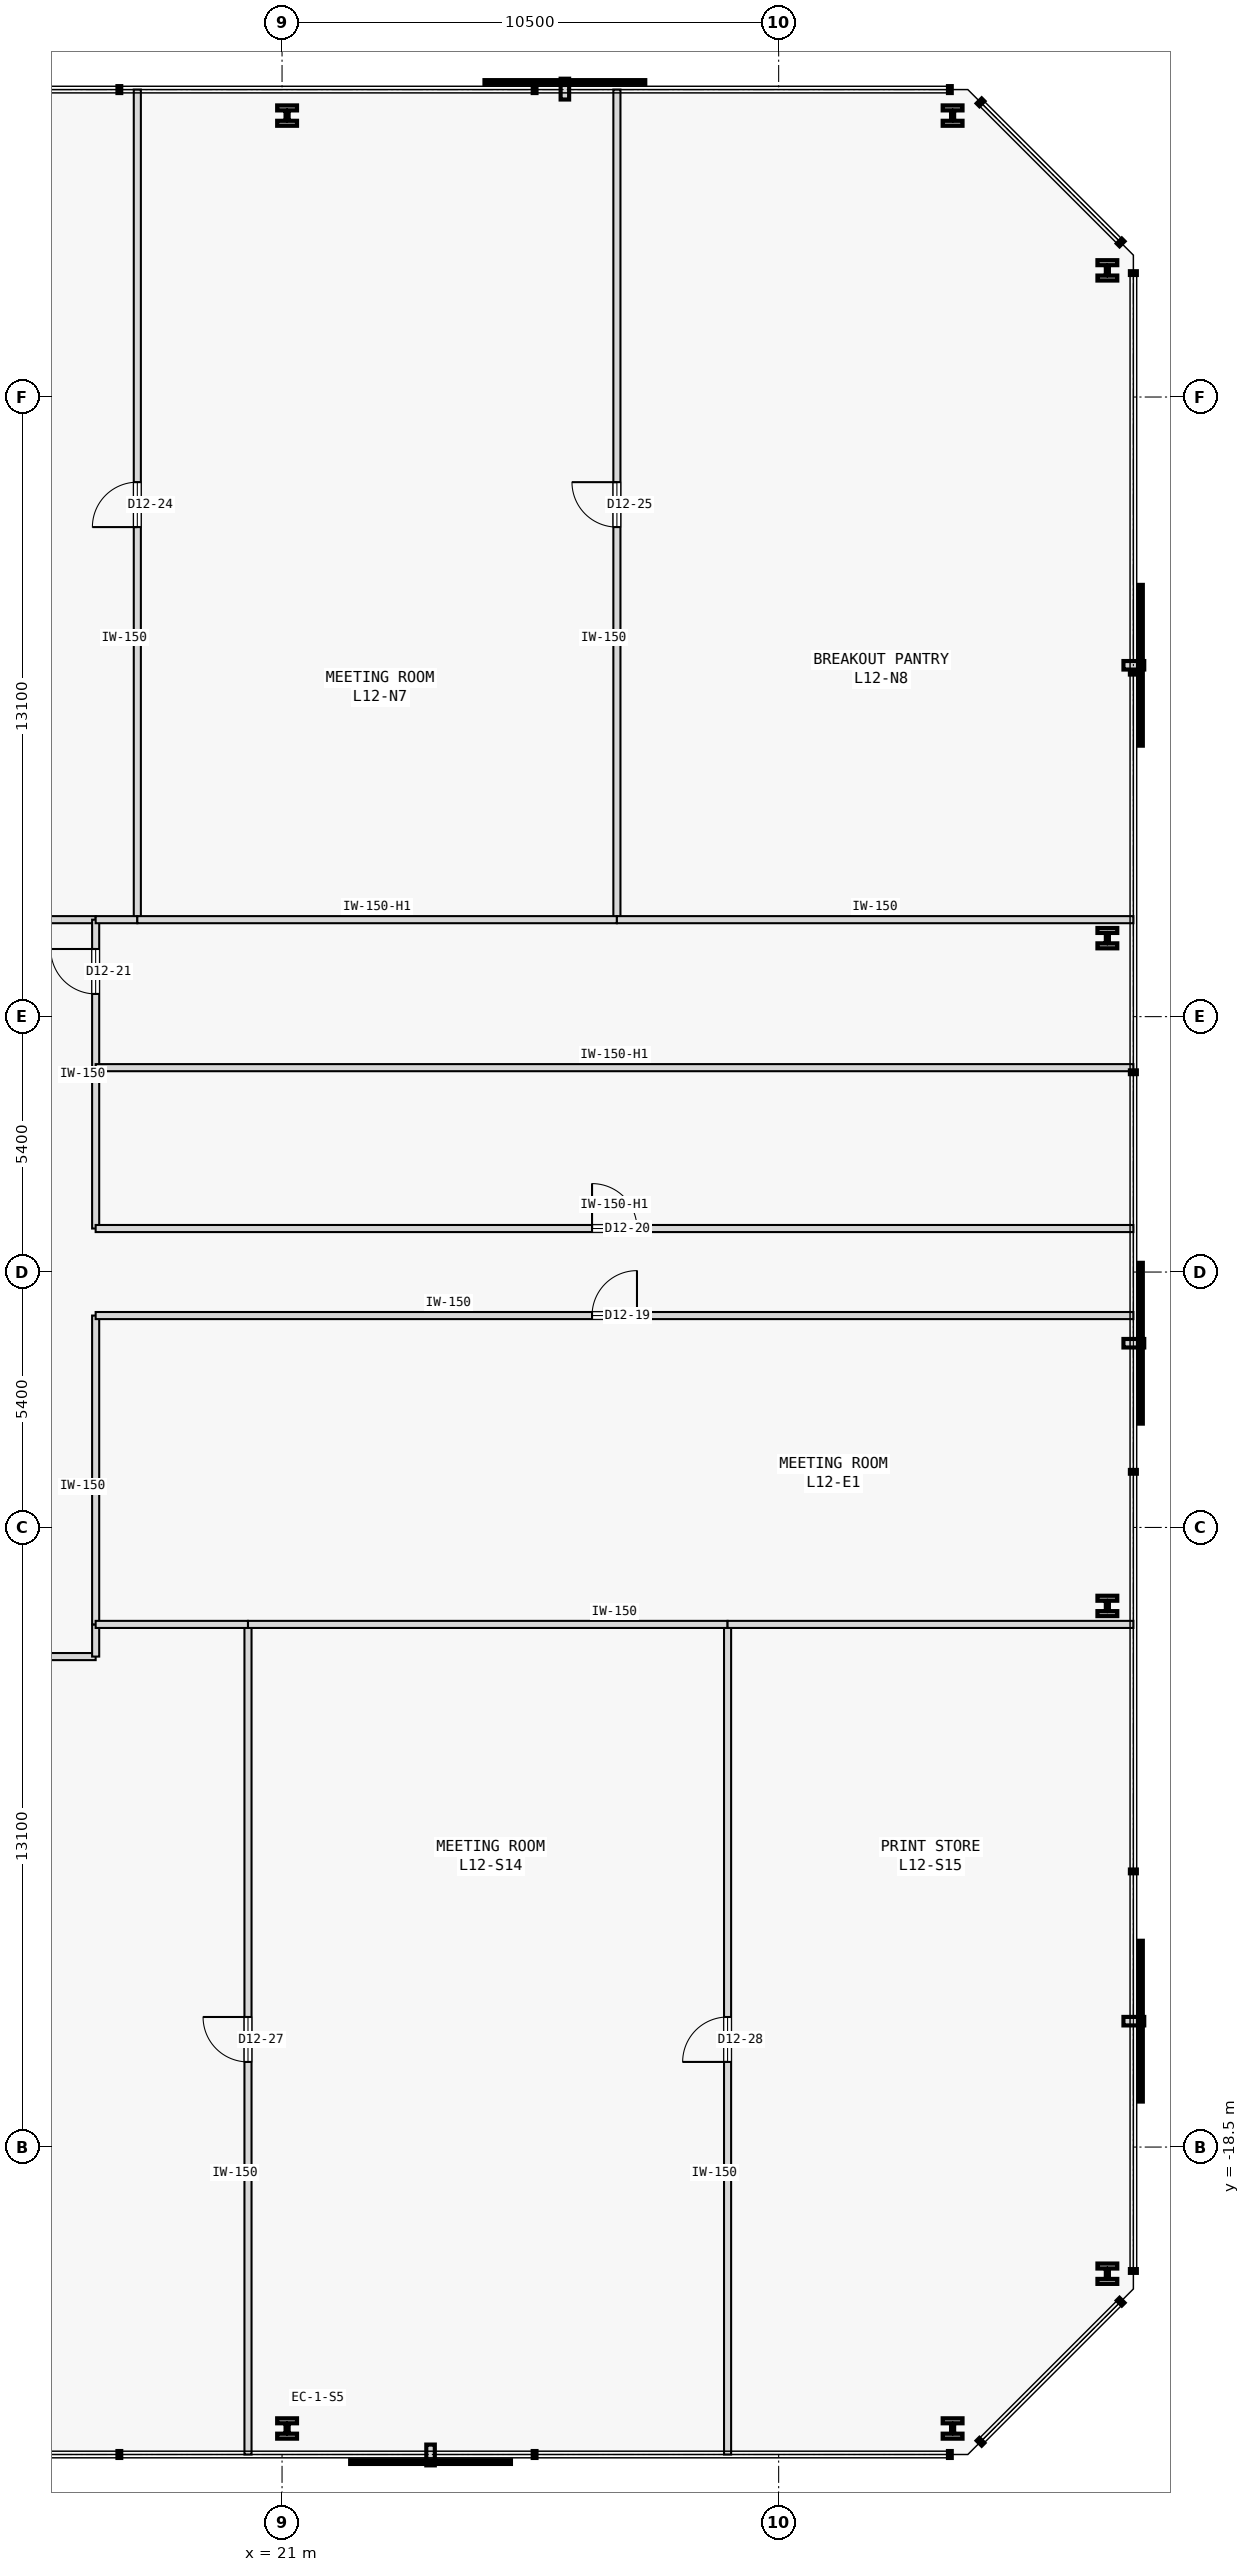
"""IFC4 building model, lengths in metres.
Left out: names, types, materials, properties, quantities, classifications, styles, units other than length and angle.
Written with IfcOpenShell. Run it as: python <this file> out.ifc"""

import sys

from ifc_helpers import new_model, si_unit, direction, frame, frame_2d, origin, origin_2d, place, context, subcontext, project, spatial, rectangle, i_section, extrude, element, fill, save


model = new_model("IFC4")
c1 = context("Model", 3, precision=1e-05, world=origin(), true_north=direction((0.0, 1.0)))
c2 = subcontext(c1, "Body", "Model", "MODEL_VIEW")
j1 = project(units=[si_unit("LENGTHUNIT", "METRE"), si_unit("PLANEANGLEUNIT", "RADIAN")], contexts=[c1])
p1 = place(None, origin())
s1 = spatial("IfcSite", under=j1, at=p1, CompositionType="ELEMENT")
p2 = place(p1, origin())
s2 = spatial("IfcBuilding", under=s1, at=p2, CompositionType="ELEMENT")
p3 = place(p2, frame((0.0, 0.0, 52.2)))
s3 = spatial("IfcBuildingStorey", under=s2, at=p3, CompositionType="ELEMENT", Elevation=52.2)
for number, where, z_axis, x_axis in (
    (1, (21.107, -24.45, 0.0), (0.0, 0.0, 1.0), (1.0, 0.0, 0.0)),
    (2, (35.178, -24.45, 0.0), (0.0, 0.0, 1.0), (1.0, 0.0, 0.0)),
    (3, (38.45, -21.178, 0.0), (0.0, 0.0, 1.0), (1.0, 0.0, 0.0)),
    (4, (38.45, -7.059, 0.0), (0.0, 0.0, 1.0), (1.0, 0.0, 0.0)),
    (5, (38.45, 7.059, 0.0), (0.0, 0.0, 1.0), (1.0, 0.0, 0.0)),
    (6, (38.45, 21.178, 0.0), (0.0, 0.0, 1.0), (1.0, 0.0, 0.0)),
    (7, (35.178, 24.45, 0.0), (0.0, 0.0, 1.0), (1.0, 0.0, 0.0)),
    (8, (21.107, 24.45, 0.0), (0.0, 0.0, 1.0), (1.0, 0.0, 0.0)),
):
    element("IfcColumn", number, at=place(p3, frame(where, z_axis=z_axis, x_axis=x_axis)), inside=s3, PredefinedType="COLUMN", context=c2, shape_type="SweptSolid", body=[
        extrude(i_section(OverallWidth=0.42, OverallDepth=0.431, WebThickness=0.065, FlangeThickness=0.106, FilletRadius=0.015, at=origin_2d()), origin(), (0.0, 0.0, 1.0), 3.8),
    ])
p4 = place(p3, frame((7.02, 7.45, 0.0), z_axis=(0.0, 0.0, 1.0), x_axis=(1.0, 0.0, 0.0)))
e9 = element("IfcWall", 9, at=p4, inside=s3, PredefinedType="PARTITIONING", context=c2, shape_type="SweptSolid", body=[
    extrude(rectangle(XDim=10.039, YDim=0.15, at=frame_2d((5.02, 0.0))), origin(), (0.0, 0.0, 1.0), 3.575),
])
p5 = place(p4, frame((4.544, 0.0, 0.0)))
e10 = element("IfcOpeningElement", 10, at=p5, cuts=e9, PredefinedType="OPENING", context=c2, shape_type="SweptSolid", body=[
    extrude(rectangle(XDim=0.95, YDim=2.15, at=frame_2d((0.475, 1.075))), frame((0.0, 0.085, 0.0), z_axis=(0.0, -1.0, 0.0), x_axis=(1.0, 0.0, 0.0)), (0.0, 0.0, 1.0), 0.17),
])
p6 = place(p3, frame((9.36, -8.13, 0.0), z_axis=(0.0, 0.0, 1.0), x_axis=(1.0, 0.0, 0.0)))
e11 = element("IfcWall", 11, at=p6, inside=s3, PredefinedType="PARTITIONING", context=c2, shape_type="SweptSolid", body=[
    extrude(rectangle(XDim=7.699, YDim=0.15, at=frame_2d((3.85, 0.0))), origin(), (0.0, 0.0, 1.0), 3.575),
])
p7 = place(p6, frame((3.375, 0.0, 0.0)))
e12 = element("IfcOpeningElement", 12, at=p7, cuts=e11, PredefinedType="OPENING", context=c2, shape_type="SweptSolid", body=[
    extrude(rectangle(XDim=0.95, YDim=2.15, at=frame_2d((0.475, 1.075))), frame((0.0, 0.085, 0.0), z_axis=(0.0, -1.0, 0.0), x_axis=(1.0, 0.0, 0.0)), (0.0, 0.0, 1.0), 0.17),
])
p8 = place(p3, frame((17.059, -8.13, 0.0), z_axis=(0.0, 0.0, 1.0), x_axis=(0.0, 1.0, 0.0)))
e13 = element("IfcWall", 13, at=p8, inside=s3, PredefinedType="PARTITIONING", context=c2, shape_type="SweptSolid", body=[
    extrude(rectangle(XDim=0.68, YDim=0.15, at=frame_2d((0.34, 0.0))), origin(), (0.0, 0.0, 1.0), 3.575),
])
p9 = place(p3, frame((17.059, -7.45, 0.0), z_axis=(0.0, 0.0, 1.0), x_axis=(0.0, 1.0, 0.0)))
e14 = element("IfcWall", 14, at=p9, inside=s3, PredefinedType="PARTITIONING", context=c2, shape_type="SweptSolid", body=[
    extrude(rectangle(XDim=6.53, YDim=0.15, at=frame_2d((3.265, 0.0))), origin(), (0.0, 0.0, 1.0), 3.575),
])
p10 = place(p3, frame((17.059, -0.92, 0.0), z_axis=(0.0, 0.0, 1.0), x_axis=(1.0, 0.0, 0.0)))
e15 = element("IfcWall", 15, at=p10, inside=s3, PredefinedType="PARTITIONING", context=c2, shape_type="SweptSolid", body=[
    extrude(rectangle(XDim=21.941, YDim=0.15, at=frame_2d((10.97, 0.0))), origin(), (0.0, 0.0, 1.0), 3.575),
])
p11 = place(p10, frame((10.496, 0.0, 0.0)))
e16 = element("IfcOpeningElement", 16, at=p11, cuts=e15, PredefinedType="OPENING", context=c2, shape_type="SweptSolid", body=[
    extrude(rectangle(XDim=0.95, YDim=2.15, at=frame_2d((0.475, 1.075))), frame((0.0, 0.085, 0.0), z_axis=(0.0, -1.0, 0.0), x_axis=(1.0, 0.0, 0.0)), (0.0, 0.0, 1.0), 0.17),
])
p12 = place(p3, frame((17.059, 0.92, 0.0), z_axis=(0.0, 0.0, 1.0), x_axis=(0.0, 1.0, 0.0)))
e17 = element("IfcWall", 17, at=p12, inside=s3, PredefinedType="PARTITIONING", context=c2, shape_type="SweptSolid", body=[
    extrude(rectangle(XDim=3.401, YDim=0.15, at=frame_2d((1.701, 0.0))), origin(), (0.0, 0.0, 1.0), 3.575),
])
p13 = place(p3, frame((17.059, 0.92, 0.0), z_axis=(0.0, 0.0, 1.0), x_axis=(1.0, 0.0, 0.0)))
e18 = element("IfcWall", 18, at=p13, inside=s3, PredefinedType="PARTITIONING", context=c2, shape_type="SweptSolid", body=[
    extrude(rectangle(XDim=21.941, YDim=0.15, at=frame_2d((10.97, 0.0))), origin(), (0.0, 0.0, 1.0), 3.125),
])
p14 = place(p13, frame((10.496, 0.0, 0.0)))
e19 = element("IfcOpeningElement", 19, at=p14, cuts=e18, PredefinedType="OPENING", context=c2, shape_type="SweptSolid", body=[
    extrude(rectangle(XDim=0.95, YDim=2.15, at=frame_2d((0.475, 1.075))), frame((0.0, 0.085, 0.0), z_axis=(0.0, -1.0, 0.0), x_axis=(1.0, 0.0, 0.0)), (0.0, 0.0, 1.0), 0.17),
])
p15 = place(p3, frame((17.059, 4.321, 0.0), z_axis=(0.0, 0.0, 1.0), x_axis=(0.0, 1.0, 0.0)))
e20 = element("IfcWall", 20, at=p15, inside=s3, PredefinedType="PARTITIONING", context=c2, shape_type="SweptSolid", body=[
    extrude(rectangle(XDim=3.129, YDim=0.15, at=frame_2d((1.564, 0.0))), origin(), (0.0, 0.0, 1.0), 3.575),
])
p16 = place(p15, frame((1.559, 0.0, 0.0)))
e21 = element("IfcOpeningElement", 21, at=p16, cuts=e20, PredefinedType="OPENING", context=c2, shape_type="SweptSolid", body=[
    extrude(rectangle(XDim=0.95, YDim=2.15, at=frame_2d((0.475, 1.075))), frame((0.0, 0.085, 0.0), z_axis=(0.0, -1.0, 0.0), x_axis=(1.0, 0.0, 0.0)), (0.0, 0.0, 1.0), 0.17),
])
p17 = place(p3, frame((17.94, 7.45, 0.0), z_axis=(0.0, 0.0, 1.0), x_axis=(0.0, 1.0, 0.0)))
e22 = element("IfcWall", 22, at=p17, inside=s3, PredefinedType="PARTITIONING", context=c2, shape_type="SweptSolid", body=[
    extrude(rectangle(XDim=17.55, YDim=0.15, at=frame_2d((8.775, 0.0))), origin(), (0.0, 0.0, 1.0), 3.575),
])
p18 = place(p17, frame((8.3, 0.0, 0.0)))
e23 = element("IfcOpeningElement", 23, at=p18, cuts=e22, PredefinedType="OPENING", context=c2, shape_type="SweptSolid", body=[
    extrude(rectangle(XDim=0.95, YDim=2.15, at=frame_2d((0.475, 1.075))), frame((0.0, 0.085, 0.0), z_axis=(0.0, -1.0, 0.0), x_axis=(1.0, 0.0, 0.0)), (0.0, 0.0, 1.0), 0.17),
])
p19 = place(p3, frame((17.059, 7.45, 0.0), z_axis=(0.0, 0.0, 1.0), x_axis=(1.0, 0.0, 0.0)))
e24 = element("IfcWall", 24, at=p19, inside=s3, PredefinedType="PARTITIONING", context=c2, shape_type="SweptSolid", body=[
    extrude(rectangle(XDim=0.881, YDim=0.15, at=frame_2d((0.44, 0.0))), origin(), (0.0, 0.0, 1.0), 3.575),
])
p20 = place(p3, frame((28.08, 7.45, 0.0), z_axis=(0.0, 0.0, 1.0), x_axis=(0.0, 1.0, 0.0)))
e25 = element("IfcWall", 25, at=p20, inside=s3, PredefinedType="PARTITIONING", context=c2, shape_type="SweptSolid", body=[
    extrude(rectangle(XDim=17.55, YDim=0.15, at=frame_2d((8.775, 0.0))), origin(), (0.0, 0.0, 1.0), 3.575),
])
p21 = place(p20, frame((8.3, 0.0, 0.0)))
e26 = element("IfcOpeningElement", 26, at=p21, cuts=e25, PredefinedType="OPENING", context=c2, shape_type="SweptSolid", body=[
    extrude(rectangle(XDim=0.95, YDim=2.15, at=frame_2d((0.475, 1.075))), frame((0.0, 0.085, 0.0), z_axis=(0.0, -1.0, 0.0), x_axis=(1.0, 0.0, 0.0)), (0.0, 0.0, 1.0), 0.17),
])
p22 = place(p3, frame((17.94, 7.45, 0.0), z_axis=(0.0, 0.0, 1.0), x_axis=(1.0, 0.0, 0.0)))
e27 = element("IfcWall", 27, at=p22, inside=s3, PredefinedType="PARTITIONING", context=c2, shape_type="SweptSolid", body=[
    extrude(rectangle(XDim=10.14, YDim=0.15, at=frame_2d((5.07, 0.0))), origin(), (0.0, 0.0, 1.0), 3.125),
])
p23 = place(p3, frame((28.08, 7.45, 0.0), z_axis=(0.0, 0.0, 1.0), x_axis=(1.0, 0.0, 0.0)))
e28 = element("IfcWall", 28, at=p23, inside=s3, PredefinedType="PARTITIONING", context=c2, shape_type="SweptSolid", body=[
    extrude(rectangle(XDim=10.92, YDim=0.15, at=frame_2d((5.46, 0.0))), origin(), (0.0, 0.0, 1.0), 3.575),
])
p24 = place(p3, frame((20.28, -25.0, 0.0), z_axis=(0.0, 0.0, 1.0), x_axis=(0.0, 1.0, 0.0)))
e29 = element("IfcWall", 29, at=p24, inside=s3, PredefinedType="PARTITIONING", context=c2, shape_type="SweptSolid", body=[
    extrude(rectangle(XDim=17.55, YDim=0.15, at=frame_2d((8.775, 0.0))), origin(), (0.0, 0.0, 1.0), 3.575),
])
p25 = place(p24, frame((8.3, 0.0, 0.0)))
e30 = element("IfcOpeningElement", 30, at=p25, cuts=e29, PredefinedType="OPENING", context=c2, shape_type="SweptSolid", body=[
    extrude(rectangle(XDim=0.95, YDim=2.15, at=frame_2d((0.475, 1.075))), frame((0.0, 0.085, 0.0), z_axis=(0.0, -1.0, 0.0), x_axis=(1.0, 0.0, 0.0)), (0.0, 0.0, 1.0), 0.17),
])
p26 = place(p3, frame((17.059, -7.45, 0.0), z_axis=(0.0, 0.0, 1.0), x_axis=(1.0, 0.0, 0.0)))
e31 = element("IfcWall", 31, at=p26, inside=s3, PredefinedType="PARTITIONING", context=c2, shape_type="SweptSolid", body=[
    extrude(rectangle(XDim=3.221, YDim=0.15, at=frame_2d((1.61, 0.0))), origin(), (0.0, 0.0, 1.0), 3.575),
])
p27 = place(p3, frame((30.42, -25.0, 0.0), z_axis=(0.0, 0.0, 1.0), x_axis=(0.0, 1.0, 0.0)))
e32 = element("IfcWall", 32, at=p27, inside=s3, PredefinedType="PARTITIONING", context=c2, shape_type="SweptSolid", body=[
    extrude(rectangle(XDim=17.55, YDim=0.15, at=frame_2d((8.775, 0.0))), origin(), (0.0, 0.0, 1.0), 3.575),
])
p28 = place(p27, frame((8.3, 0.0, 0.0)))
e33 = element("IfcOpeningElement", 33, at=p28, cuts=e32, PredefinedType="OPENING", context=c2, shape_type="SweptSolid", body=[
    extrude(rectangle(XDim=0.95, YDim=2.15, at=frame_2d((0.475, 1.075))), frame((0.0, 0.085, 0.0), z_axis=(0.0, -1.0, 0.0), x_axis=(1.0, 0.0, 0.0)), (0.0, 0.0, 1.0), 0.17),
])
p29 = place(p3, frame((20.28, -7.45, 0.0), z_axis=(0.0, 0.0, 1.0), x_axis=(1.0, 0.0, 0.0)))
e34 = element("IfcWall", 34, at=p29, inside=s3, PredefinedType="PARTITIONING", context=c2, shape_type="SweptSolid", body=[
    extrude(rectangle(XDim=10.14, YDim=0.15, at=frame_2d((5.07, 0.0))), origin(), (0.0, 0.0, 1.0), 3.575),
])
p30 = place(p3, frame((30.42, -7.45, 0.0), z_axis=(0.0, 0.0, 1.0), x_axis=(1.0, 0.0, 0.0)))
e35 = element("IfcWall", 35, at=p30, inside=s3, PredefinedType="PARTITIONING", context=c2, shape_type="SweptSolid", body=[
    extrude(rectangle(XDim=8.58, YDim=0.15, at=frame_2d((4.29, 0.0))), origin(), (0.0, 0.0, 1.0), 3.575),
])
p31 = place(p3, frame((17.059, 4.321, 0.0), z_axis=(0.0, 0.0, 1.0), x_axis=(1.0, 0.0, 0.0)))
e36 = element("IfcWall", 36, at=p31, inside=s3, PredefinedType="PARTITIONING", context=c2, shape_type="SweptSolid", body=[
    extrude(rectangle(XDim=21.941, YDim=0.15, at=frame_2d((10.97, 0.0))), origin(), (0.0, 0.0, 1.0), 3.125),
])
p32 = place(p11, origin())
e37 = element("IfcDoor", 37, at=p32, inside=s3, OperationType="SINGLE_SWING_RIGHT", PredefinedType="DOOR", context=c2, shape_type="SweptSolid", body=[
    extrude(rectangle(XDim=0.95, YDim=2.15, at=frame_2d((0.475, 1.075))), frame((0.0, 0.025, 0.0), z_axis=(0.0, -1.0, 0.0), x_axis=(1.0, 0.0, 0.0)), (0.0, 0.0, 1.0), 0.05),
])
fill(e16, e37)
p33 = place(p14, origin())
e38 = element("IfcDoor", 38, at=p33, inside=s3, OperationType="SINGLE_SWING_LEFT", PredefinedType="DOOR", context=c2, shape_type="SweptSolid", body=[
    extrude(rectangle(XDim=0.95, YDim=2.15, at=frame_2d((0.475, 1.075))), frame((0.0, 0.025, 0.0), z_axis=(0.0, -1.0, 0.0), x_axis=(1.0, 0.0, 0.0)), (0.0, 0.0, 1.0), 0.05),
])
fill(e19, e38)
p34 = place(p16, origin())
e39 = element("IfcDoor", 39, at=p34, inside=s3, OperationType="SINGLE_SWING_RIGHT", PredefinedType="DOOR", context=c2, shape_type="SweptSolid", body=[
    extrude(rectangle(XDim=0.95, YDim=2.15, at=frame_2d((0.475, 1.075))), frame((0.0, 0.025, 0.0), z_axis=(0.0, -1.0, 0.0), x_axis=(1.0, 0.0, 0.0)), (0.0, 0.0, 1.0), 0.05),
])
fill(e21, e39)
p35 = place(p18, origin())
e40 = element("IfcDoor", 40, at=p35, inside=s3, OperationType="SINGLE_SWING_LEFT", PredefinedType="DOOR", context=c2, shape_type="SweptSolid", body=[
    extrude(rectangle(XDim=0.95, YDim=2.15, at=frame_2d((0.475, 1.075))), frame((0.0, 0.025, 0.0), z_axis=(0.0, -1.0, 0.0), x_axis=(1.0, 0.0, 0.0)), (0.0, 0.0, 1.0), 0.05),
])
fill(e23, e40)
p36 = place(p21, origin())
e41 = element("IfcDoor", 41, at=p36, inside=s3, OperationType="SINGLE_SWING_RIGHT", PredefinedType="DOOR", context=c2, shape_type="SweptSolid", body=[
    extrude(rectangle(XDim=0.95, YDim=2.15, at=frame_2d((0.475, 1.075))), frame((0.0, 0.025, 0.0), z_axis=(0.0, -1.0, 0.0), x_axis=(1.0, 0.0, 0.0)), (0.0, 0.0, 1.0), 0.05),
])
fill(e26, e41)
p37 = place(p25, origin())
e42 = element("IfcDoor", 42, at=p37, inside=s3, OperationType="SINGLE_SWING_RIGHT", PredefinedType="DOOR", context=c2, shape_type="SweptSolid", body=[
    extrude(rectangle(XDim=0.95, YDim=2.15, at=frame_2d((0.475, 1.075))), frame((0.0, 0.025, 0.0), z_axis=(0.0, -1.0, 0.0), x_axis=(1.0, 0.0, 0.0)), (0.0, 0.0, 1.0), 0.05),
])
fill(e30, e42)
p38 = place(p28, origin())
e43 = element("IfcDoor", 43, at=p38, inside=s3, OperationType="SINGLE_SWING_LEFT", PredefinedType="DOOR", context=c2, shape_type="SweptSolid", body=[
    extrude(rectangle(XDim=0.95, YDim=2.15, at=frame_2d((0.475, 1.075))), frame((0.0, 0.025, 0.0), z_axis=(0.0, -1.0, 0.0), x_axis=(1.0, 0.0, 0.0)), (0.0, 0.0, 1.0), 0.05),
])
fill(e33, e43)
save(model, sys.argv[1])
